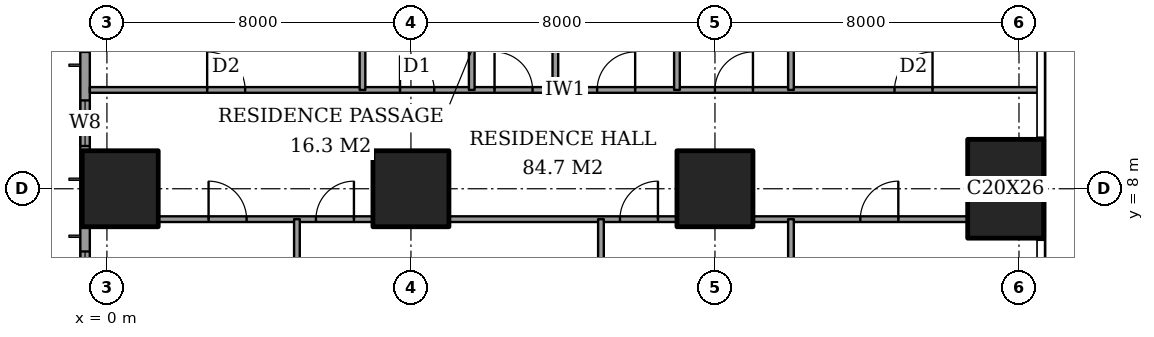
"""IFC4 building model, lengths in metres.
Left out: names, types, materials, properties, quantities, classifications, styles, units other than length and angle.
Written with IfcOpenShell. Run it as: python <this file> out.ifc"""

import sys

from ifc_helpers import new_model, si_unit, direction, frame, frame_2d, origin, origin_2d, place, context, subcontext, project, spatial, rectangle, extrude, element, fill, save


model = new_model("IFC4")
c1 = context("Model", 3, precision=1e-05, world=origin(), true_north=direction((0.0, 1.0)))
c2 = subcontext(c1, "Body", "Model", "MODEL_VIEW")
j1 = project(units=[si_unit("LENGTHUNIT", "METRE"), si_unit("PLANEANGLEUNIT", "RADIAN")], contexts=[c1])
p1 = place(None, origin())
s1 = spatial("IfcSite", under=j1, at=p1, CompositionType="ELEMENT")
p2 = place(p1, origin())
s2 = spatial("IfcBuilding", under=s1, at=p2, CompositionType="ELEMENT")
p3 = place(p2, frame((0.0, 0.0, 65.6)))
s3 = spatial("IfcBuildingStorey", under=s2, at=p3, CompositionType="ELEMENT", Elevation=65.6)
for number, where, z_axis, x_axis in (
    (1, (0.35, 8.0, 0.0), (0.0, 0.0, 1.0), (1.0, 0.0, 0.0)),
    (2, (8.0, 8.0, 0.0), (0.0, 0.0, 1.0), (1.0, 0.0, 0.0)),
    (3, (16.0, 8.0, 0.0), (0.0, 0.0, 1.0), (1.0, 0.0, 0.0)),
):
    element("IfcColumn", number, at=place(p3, frame(where, z_axis=z_axis, x_axis=x_axis)), inside=s3, PredefinedType="COLUMN", context=c2, shape_type="SweptSolid", body=[
        extrude(rectangle(XDim=2.0, YDim=2.0, at=origin_2d()), origin(), (0.0, 0.0, 1.0), 3.6),
    ])
p4 = place(p3, frame((23.65, 8.0, 0.0), z_axis=(0.0, 0.0, 1.0), x_axis=(1.0, 0.0, 0.0)))
e4 = element("IfcColumn", 4, at=p4, inside=s3, PredefinedType="COLUMN", context=c2, shape_type="SweptSolid", body=[
    extrude(rectangle(XDim=2.0, YDim=2.6, at=origin_2d()), origin(), (0.0, 0.0, 1.0), 3.6),
])
p5 = place(p3, frame((-0.575, 44.825, 0.0), z_axis=(0.0, 0.0, 1.0), x_axis=(0.0, -1.0, 0.0)))
e5 = element("IfcWall", 5, at=p5, inside=s3, PredefinedType="SOLIDWALL", context=c2, shape_type="SweptSolid", body=[
    extrude(rectangle(XDim=41.65, YDim=0.25, at=frame_2d((20.825, 0.0))), origin(), (0.0, 0.0, 1.0), 3.6),
])
p6 = place(p5, frame((0.775, 0.0, 0.6)))
e6 = element("IfcOpeningElement", 6, at=p6, cuts=e5, PredefinedType="OPENING", context=c2, shape_type="SweptSolid", body=[
    extrude(rectangle(XDim=2.4, YDim=2.0, at=frame_2d((1.2, 1.0))), frame((0.0, 0.135, 0.0), z_axis=(0.0, -1.0, 0.0), x_axis=(1.0, 0.0, 0.0)), (0.0, 0.0, 1.0), 0.27),
])
p7 = place(p5, frame((6.1, 0.0, 0.6)))
e7 = element("IfcOpeningElement", 7, at=p7, cuts=e5, PredefinedType="OPENING", context=c2, shape_type="SweptSolid", body=[
    extrude(rectangle(XDim=1.2, YDim=2.0, at=frame_2d((0.6, 1.0))), frame((0.0, 0.135, 0.0), z_axis=(0.0, -1.0, 0.0), x_axis=(1.0, 0.0, 0.0)), (0.0, 0.0, 1.0), 0.27),
])
p8 = place(p5, frame((8.425, 0.0, 0.6)))
e8 = element("IfcOpeningElement", 8, at=p8, cuts=e5, PredefinedType="OPENING", context=c2, shape_type="SweptSolid", body=[
    extrude(rectangle(XDim=2.4, YDim=2.0, at=frame_2d((1.2, 1.0))), frame((0.0, 0.135, 0.0), z_axis=(0.0, -1.0, 0.0), x_axis=(1.0, 0.0, 0.0)), (0.0, 0.0, 1.0), 0.27),
])
p9 = place(p5, frame((15.625, 0.0, 0.6)))
e9 = element("IfcOpeningElement", 9, at=p9, cuts=e5, PredefinedType="OPENING", context=c2, shape_type="SweptSolid", body=[
    extrude(rectangle(XDim=2.4, YDim=2.0, at=frame_2d((1.2, 1.0))), frame((0.0, 0.135, 0.0), z_axis=(0.0, -1.0, 0.0), x_axis=(1.0, 0.0, 0.0)), (0.0, 0.0, 1.0), 0.27),
])
p10 = place(p5, frame((23.625, 0.0, 0.6)))
e10 = element("IfcOpeningElement", 10, at=p10, cuts=e5, PredefinedType="OPENING", context=c2, shape_type="SweptSolid", body=[
    extrude(rectangle(XDim=2.4, YDim=2.0, at=frame_2d((1.2, 1.0))), frame((0.0, 0.135, 0.0), z_axis=(0.0, -1.0, 0.0), x_axis=(1.0, 0.0, 0.0)), (0.0, 0.0, 1.0), 0.27),
])
p11 = place(p5, frame((30.825, 0.0, 0.6)))
e11 = element("IfcOpeningElement", 11, at=p11, cuts=e5, PredefinedType="OPENING", context=c2, shape_type="SweptSolid", body=[
    extrude(rectangle(XDim=2.4, YDim=2.0, at=frame_2d((1.2, 1.0))), frame((0.0, 0.135, 0.0), z_axis=(0.0, -1.0, 0.0), x_axis=(1.0, 0.0, 0.0)), (0.0, 0.0, 1.0), 0.27),
])
p12 = place(p5, frame((34.5, 0.0, 0.6)))
e12 = element("IfcOpeningElement", 12, at=p12, cuts=e5, PredefinedType="OPENING", context=c2, shape_type="SweptSolid", body=[
    extrude(rectangle(XDim=1.2, YDim=2.0, at=frame_2d((0.6, 1.0))), frame((0.0, 0.135, 0.0), z_axis=(0.0, -1.0, 0.0), x_axis=(1.0, 0.0, 0.0)), (0.0, 0.0, 1.0), 0.27),
])
p13 = place(p5, frame((38.475, 0.0, 0.6)))
e13 = element("IfcOpeningElement", 13, at=p13, cuts=e5, PredefinedType="OPENING", context=c2, shape_type="SweptSolid", body=[
    extrude(rectangle(XDim=2.4, YDim=2.0, at=frame_2d((1.2, 1.0))), frame((0.0, 0.135, 0.0), z_axis=(0.0, -1.0, 0.0), x_axis=(1.0, 0.0, 0.0)), (0.0, 0.0, 1.0), 0.27),
])
p14 = place(p3, frame((1.35, 7.2, 0.0), z_axis=(0.0, 0.0, 1.0), x_axis=(1.0, 0.0, 0.0)))
e14 = element("IfcWall", 14, at=p14, inside=s3, PredefinedType="PARTITIONING", context=c2, shape_type="SweptSolid", body=[
    extrude(rectangle(XDim=5.65, YDim=0.15, at=frame_2d((2.825, 0.0))), origin(), (0.0, 0.0, 1.0), 3.35),
])
p15 = place(p14, frame((1.325, 0.0, 0.0)))
e15 = element("IfcOpeningElement", 15, at=p15, cuts=e14, PredefinedType="OPENING", context=c2, shape_type="SweptSolid", body=[
    extrude(rectangle(XDim=1.0, YDim=2.1, at=frame_2d((0.5, 1.05))), frame((0.0, 0.085, 0.0), z_axis=(0.0, -1.0, 0.0), x_axis=(1.0, 0.0, 0.0)), (0.0, 0.0, 1.0), 0.17),
])
p16 = place(p14, frame((4.15, 0.0, 0.0)))
e16 = element("IfcOpeningElement", 16, at=p16, cuts=e14, PredefinedType="OPENING", context=c2, shape_type="SweptSolid", body=[
    extrude(rectangle(XDim=1.0, YDim=2.1, at=frame_2d((0.5, 1.05))), frame((0.0, 0.085, 0.0), z_axis=(0.0, -1.0, 0.0), x_axis=(1.0, 0.0, 0.0)), (0.0, 0.0, 1.0), 0.17),
])
p17 = place(p3, frame((9.0, 7.2, 0.0), z_axis=(0.0, 0.0, 1.0), x_axis=(1.0, 0.0, 0.0)))
e17 = element("IfcWall", 17, at=p17, inside=s3, PredefinedType="PARTITIONING", context=c2, shape_type="SweptSolid", body=[
    extrude(rectangle(XDim=6.0, YDim=0.15, at=frame_2d((3.0, 0.0))), origin(), (0.0, 0.0, 1.0), 3.35),
])
p18 = place(p17, frame((4.5, 0.0, 0.0)))
e18 = element("IfcOpeningElement", 18, at=p18, cuts=e17, PredefinedType="OPENING", context=c2, shape_type="SweptSolid", body=[
    extrude(rectangle(XDim=1.0, YDim=2.1, at=frame_2d((0.5, 1.05))), frame((0.0, 0.085, 0.0), z_axis=(0.0, -1.0, 0.0), x_axis=(1.0, 0.0, 0.0)), (0.0, 0.0, 1.0), 0.17),
])
p19 = place(p3, frame((17.0, 7.2, 0.0), z_axis=(0.0, 0.0, 1.0), x_axis=(1.0, 0.0, 0.0)))
e19 = element("IfcWall", 19, at=p19, inside=s3, PredefinedType="PARTITIONING", context=c2, shape_type="SweptSolid", body=[
    extrude(rectangle(XDim=5.65, YDim=0.15, at=frame_2d((2.825, 0.0))), origin(), (0.0, 0.0, 1.0), 3.35),
])
p20 = place(p19, frame((2.825, 0.0, 0.0)))
e20 = element("IfcOpeningElement", 20, at=p20, cuts=e19, PredefinedType="OPENING", context=c2, shape_type="SweptSolid", body=[
    extrude(rectangle(XDim=1.0, YDim=2.1, at=frame_2d((0.5, 1.05))), frame((0.0, 0.085, 0.0), z_axis=(0.0, -1.0, 0.0), x_axis=(1.0, 0.0, 0.0)), (0.0, 0.0, 1.0), 0.17),
])
p21 = place(p3, frame((-0.45, 10.6, 0.0), z_axis=(0.0, 0.0, 1.0), x_axis=(1.0, 0.0, 0.0)))
e21 = element("IfcWall", 21, at=p21, inside=s3, PredefinedType="PARTITIONING", context=c2, shape_type="SweptSolid", body=[
    extrude(rectangle(XDim=25.011, YDim=0.15, at=frame_2d((12.505, 0.0))), origin(), (0.0, 0.0, 1.0), 3.35),
])
p22 = place(p21, frame((10.65, 0.0, 0.0)))
e22 = element("IfcOpeningElement", 22, at=p22, cuts=e21, PredefinedType="OPENING", context=c2, shape_type="SweptSolid", body=[
    extrude(rectangle(XDim=1.0, YDim=2.1, at=frame_2d((0.5, 1.05))), frame((0.0, 0.085, 0.0), z_axis=(0.0, -1.0, 0.0), x_axis=(1.0, 0.0, 0.0)), (0.0, 0.0, 1.0), 0.17),
])
p23 = place(p21, frame((3.087, 0.0, 0.0)))
e23 = element("IfcOpeningElement", 23, at=p23, cuts=e21, PredefinedType="OPENING", context=c2, shape_type="SweptSolid", body=[
    extrude(rectangle(XDim=1.0, YDim=2.1, at=frame_2d((0.5, 1.05))), frame((0.0, 0.085, 0.0), z_axis=(0.0, -1.0, 0.0), x_axis=(1.0, 0.0, 0.0)), (0.0, 0.0, 1.0), 0.17),
])
p24 = place(p21, frame((8.163, 0.0, 0.0)))
e24 = element("IfcOpeningElement", 24, at=p24, cuts=e21, PredefinedType="OPENING", context=c2, shape_type="SweptSolid", body=[
    extrude(rectangle(XDim=0.9, YDim=2.1, at=frame_2d((0.45, 1.05))), frame((0.0, 0.085, 0.0), z_axis=(0.0, -1.0, 0.0), x_axis=(1.0, 0.0, 0.0)), (0.0, 0.0, 1.0), 0.17),
])
p25 = place(p21, frame((13.35, 0.0, 0.0)))
e25 = element("IfcOpeningElement", 25, at=p25, cuts=e21, PredefinedType="OPENING", context=c2, shape_type="SweptSolid", body=[
    extrude(rectangle(XDim=1.0, YDim=2.1, at=frame_2d((0.5, 1.05))), frame((0.0, 0.085, 0.0), z_axis=(0.0, -1.0, 0.0), x_axis=(1.0, 0.0, 0.0)), (0.0, 0.0, 1.0), 0.17),
])
p26 = place(p21, frame((16.45, 0.0, 0.0)))
e26 = element("IfcOpeningElement", 26, at=p26, cuts=e21, PredefinedType="OPENING", context=c2, shape_type="SweptSolid", body=[
    extrude(rectangle(XDim=1.0, YDim=2.1, at=frame_2d((0.5, 1.05))), frame((0.0, 0.085, 0.0), z_axis=(0.0, -1.0, 0.0), x_axis=(1.0, 0.0, 0.0)), (0.0, 0.0, 1.0), 0.17),
])
p27 = place(p21, frame((21.175, 0.0, 0.0)))
e27 = element("IfcOpeningElement", 27, at=p27, cuts=e21, PredefinedType="OPENING", context=c2, shape_type="SweptSolid", body=[
    extrude(rectangle(XDim=1.0, YDim=2.1, at=frame_2d((0.5, 1.05))), frame((0.0, 0.085, 0.0), z_axis=(0.0, -1.0, 0.0), x_axis=(1.0, 0.0, 0.0)), (0.0, 0.0, 1.0), 0.17),
])
p28 = place(p3, frame((5.0, -0.45, 0.0), z_axis=(0.0, 0.0, 1.0), x_axis=(0.0, 1.0, 0.0)))
e28 = element("IfcWall", 28, at=p28, inside=s3, PredefinedType="PARTITIONING", context=c2, shape_type="SweptSolid", body=[
    extrude(rectangle(XDim=7.65, YDim=0.15, at=frame_2d((3.825, 0.0))), origin(), (0.0, 0.0, 1.0), 3.35),
])
p29 = place(p3, frame((6.725, 10.6, 0.0), z_axis=(0.0, 0.0, 1.0), x_axis=(0.0, 1.0, 0.0)))
e29 = element("IfcWall", 29, at=p29, inside=s3, PredefinedType="PARTITIONING", context=c2, shape_type="SweptSolid", body=[
    extrude(rectangle(XDim=4.2, YDim=0.15, at=frame_2d((2.1, 0.0))), origin(), (0.0, 0.0, 1.0), 3.35),
])
p30 = place(p3, frame((9.6, 10.6, 0.0), z_axis=(0.0, 0.0, 1.0), x_axis=(0.0, 1.0, 0.0)))
e30 = element("IfcWall", 30, at=p30, inside=s3, PredefinedType="PARTITIONING", context=c2, shape_type="SweptSolid", body=[
    extrude(rectangle(XDim=11.0, YDim=0.15, at=frame_2d((5.5, 0.0))), origin(), (0.0, 0.0, 1.0), 3.35),
])
p31 = place(p30, frame((8.7, 0.0, 0.0)))
e31 = element("IfcOpeningElement", 31, at=p31, cuts=e30, PredefinedType="OPENING", context=c2, shape_type="SweptSolid", body=[
    extrude(rectangle(XDim=1.0, YDim=2.1, at=frame_2d((0.5, 1.05))), frame((0.0, 0.085, 0.0), z_axis=(0.0, -1.0, 0.0), x_axis=(1.0, 0.0, 0.0)), (0.0, 0.0, 1.0), 0.17),
])
p32 = place(p3, frame((11.8, 10.6, 0.0), z_axis=(0.0, 0.0, 1.0), x_axis=(0.0, 1.0, 0.0)))
e32 = element("IfcWall", 32, at=p32, inside=s3, PredefinedType="PARTITIONING", context=c2, shape_type="SweptSolid", body=[
    extrude(rectangle(XDim=7.4, YDim=0.15, at=frame_2d((3.7, 0.0))), origin(), (0.0, 0.0, 1.0), 3.35),
])
p33 = place(p3, frame((13.0, -0.45, 0.0), z_axis=(0.0, 0.0, 1.0), x_axis=(0.0, 1.0, 0.0)))
e33 = element("IfcWall", 33, at=p33, inside=s3, PredefinedType="PARTITIONING", context=c2, shape_type="SweptSolid", body=[
    extrude(rectangle(XDim=7.65, YDim=0.15, at=frame_2d((3.825, 0.0))), origin(), (0.0, 0.0, 1.0), 3.35),
])
p34 = place(p3, frame((15.0, 10.6, 0.0), z_axis=(0.0, 0.0, 1.0), x_axis=(0.0, 1.0, 0.0)))
e34 = element("IfcWall", 34, at=p34, inside=s3, PredefinedType="PARTITIONING", context=c2, shape_type="SweptSolid", body=[
    extrude(rectangle(XDim=4.2, YDim=0.15, at=frame_2d((2.1, 0.0))), origin(), (0.0, 0.0, 1.0), 3.35),
])
p35 = place(p3, frame((18.0, -0.45, 0.0), z_axis=(0.0, 0.0, 1.0), x_axis=(0.0, 1.0, 0.0)))
e35 = element("IfcWall", 35, at=p35, inside=s3, PredefinedType="PARTITIONING", context=c2, shape_type="SweptSolid", body=[
    extrude(rectangle(XDim=7.65, YDim=0.15, at=frame_2d((3.825, 0.0))), origin(), (0.0, 0.0, 1.0), 3.35),
])
p36 = place(p3, frame((18.0, 10.6, 0.0), z_axis=(0.0, 0.0, 1.0), x_axis=(0.0, 1.0, 0.0)))
e36 = element("IfcWall", 36, at=p36, inside=s3, PredefinedType="PARTITIONING", context=c2, shape_type="SweptSolid", body=[
    extrude(rectangle(XDim=7.4, YDim=0.15, at=frame_2d((3.7, 0.0))), origin(), (0.0, 0.0, 1.0), 3.35),
])
p37 = place(p12, origin())
e37 = element("IfcWindow", 37, at=p37, inside=s3, PartitioningType="SINGLE_PANEL", PredefinedType="WINDOW", context=c2, shape_type="SweptSolid", body=[
    extrude(rectangle(XDim=1.2, YDim=2.0, at=frame_2d((0.6, 1.0))), frame((0.0, 0.03, 0.0), z_axis=(0.0, -1.0, 0.0), x_axis=(1.0, 0.0, 0.0)), (0.0, 0.0, 1.0), 0.06),
])
fill(e12, e37)
p38 = place(p13, origin())
e38 = element("IfcWindow", 38, at=p38, inside=s3, PartitioningType="SINGLE_PANEL", PredefinedType="WINDOW", context=c2, shape_type="SweptSolid", body=[
    extrude(rectangle(XDim=2.4, YDim=2.0, at=frame_2d((1.2, 1.0))), frame((0.0, 0.03, 0.0), z_axis=(0.0, -1.0, 0.0), x_axis=(1.0, 0.0, 0.0)), (0.0, 0.0, 1.0), 0.06),
])
fill(e13, e38)
p39 = place(p15, origin())
e39 = element("IfcDoor", 39, at=p39, inside=s3, OperationType="SINGLE_SWING_RIGHT", PredefinedType="DOOR", context=c2, shape_type="SweptSolid", body=[
    extrude(rectangle(XDim=1.0, YDim=2.1, at=frame_2d((0.5, 1.05))), frame((0.0, 0.025, 0.0), z_axis=(0.0, -1.0, 0.0), x_axis=(1.0, 0.0, 0.0)), (0.0, 0.0, 1.0), 0.05),
])
fill(e15, e39)
p40 = place(p16, origin())
e40 = element("IfcDoor", 40, at=p40, inside=s3, OperationType="SINGLE_SWING_LEFT", PredefinedType="DOOR", context=c2, shape_type="SweptSolid", body=[
    extrude(rectangle(XDim=1.0, YDim=2.1, at=frame_2d((0.5, 1.05))), frame((0.0, 0.025, 0.0), z_axis=(0.0, -1.0, 0.0), x_axis=(1.0, 0.0, 0.0)), (0.0, 0.0, 1.0), 0.05),
])
fill(e16, e40)
p41 = place(p18, origin())
e41 = element("IfcDoor", 41, at=p41, inside=s3, OperationType="SINGLE_SWING_LEFT", PredefinedType="DOOR", context=c2, shape_type="SweptSolid", body=[
    extrude(rectangle(XDim=1.0, YDim=2.1, at=frame_2d((0.5, 1.05))), frame((0.0, 0.025, 0.0), z_axis=(0.0, -1.0, 0.0), x_axis=(1.0, 0.0, 0.0)), (0.0, 0.0, 1.0), 0.05),
])
fill(e18, e41)
p42 = place(p20, origin())
e42 = element("IfcDoor", 42, at=p42, inside=s3, OperationType="SINGLE_SWING_LEFT", PredefinedType="DOOR", context=c2, shape_type="SweptSolid", body=[
    extrude(rectangle(XDim=1.0, YDim=2.1, at=frame_2d((0.5, 1.05))), frame((0.0, 0.025, 0.0), z_axis=(0.0, -1.0, 0.0), x_axis=(1.0, 0.0, 0.0)), (0.0, 0.0, 1.0), 0.05),
])
fill(e20, e42)
p43 = place(p22, origin())
e43 = element("IfcDoor", 43, at=p43, inside=s3, OperationType="SINGLE_SWING_RIGHT", PredefinedType="DOOR", context=c2, shape_type="SweptSolid", body=[
    extrude(rectangle(XDim=1.0, YDim=2.1, at=frame_2d((0.5, 1.05))), frame((0.0, 0.025, 0.0), z_axis=(0.0, -1.0, 0.0), x_axis=(1.0, 0.0, 0.0)), (0.0, 0.0, 1.0), 0.05),
])
fill(e22, e43)
p44 = place(p23, origin())
e44 = element("IfcDoor", 44, at=p44, inside=s3, OperationType="SINGLE_SWING_RIGHT", PredefinedType="DOOR", context=c2, shape_type="SweptSolid", body=[
    extrude(rectangle(XDim=1.0, YDim=2.1, at=frame_2d((0.5, 1.05))), frame((0.0, 0.025, 0.0), z_axis=(0.0, -1.0, 0.0), x_axis=(1.0, 0.0, 0.0)), (0.0, 0.0, 1.0), 0.05),
])
fill(e23, e44)
p45 = place(p24, origin())
e45 = element("IfcDoor", 45, at=p45, inside=s3, OperationType="SINGLE_SWING_RIGHT", PredefinedType="DOOR", context=c2, shape_type="SweptSolid", body=[
    extrude(rectangle(XDim=0.9, YDim=2.1, at=frame_2d((0.45, 1.05))), frame((0.0, 0.025, 0.0), z_axis=(0.0, -1.0, 0.0), x_axis=(1.0, 0.0, 0.0)), (0.0, 0.0, 1.0), 0.05),
])
fill(e24, e45)
p46 = place(p25, origin())
e46 = element("IfcDoor", 46, at=p46, inside=s3, OperationType="SINGLE_SWING_LEFT", PredefinedType="DOOR", context=c2, shape_type="SweptSolid", body=[
    extrude(rectangle(XDim=1.0, YDim=2.1, at=frame_2d((0.5, 1.05))), frame((0.0, 0.025, 0.0), z_axis=(0.0, -1.0, 0.0), x_axis=(1.0, 0.0, 0.0)), (0.0, 0.0, 1.0), 0.05),
])
fill(e25, e46)
p47 = place(p26, origin())
e47 = element("IfcDoor", 47, at=p47, inside=s3, OperationType="SINGLE_SWING_LEFT", PredefinedType="DOOR", context=c2, shape_type="SweptSolid", body=[
    extrude(rectangle(XDim=1.0, YDim=2.1, at=frame_2d((0.5, 1.05))), frame((0.0, 0.025, 0.0), z_axis=(0.0, -1.0, 0.0), x_axis=(1.0, 0.0, 0.0)), (0.0, 0.0, 1.0), 0.05),
])
fill(e26, e47)
p48 = place(p27, origin())
e48 = element("IfcDoor", 48, at=p48, inside=s3, OperationType="SINGLE_SWING_LEFT", PredefinedType="DOOR", context=c2, shape_type="SweptSolid", body=[
    extrude(rectangle(XDim=1.0, YDim=2.1, at=frame_2d((0.5, 1.05))), frame((0.0, 0.025, 0.0), z_axis=(0.0, -1.0, 0.0), x_axis=(1.0, 0.0, 0.0)), (0.0, 0.0, 1.0), 0.05),
])
fill(e27, e48)
save(model, sys.argv[1])
